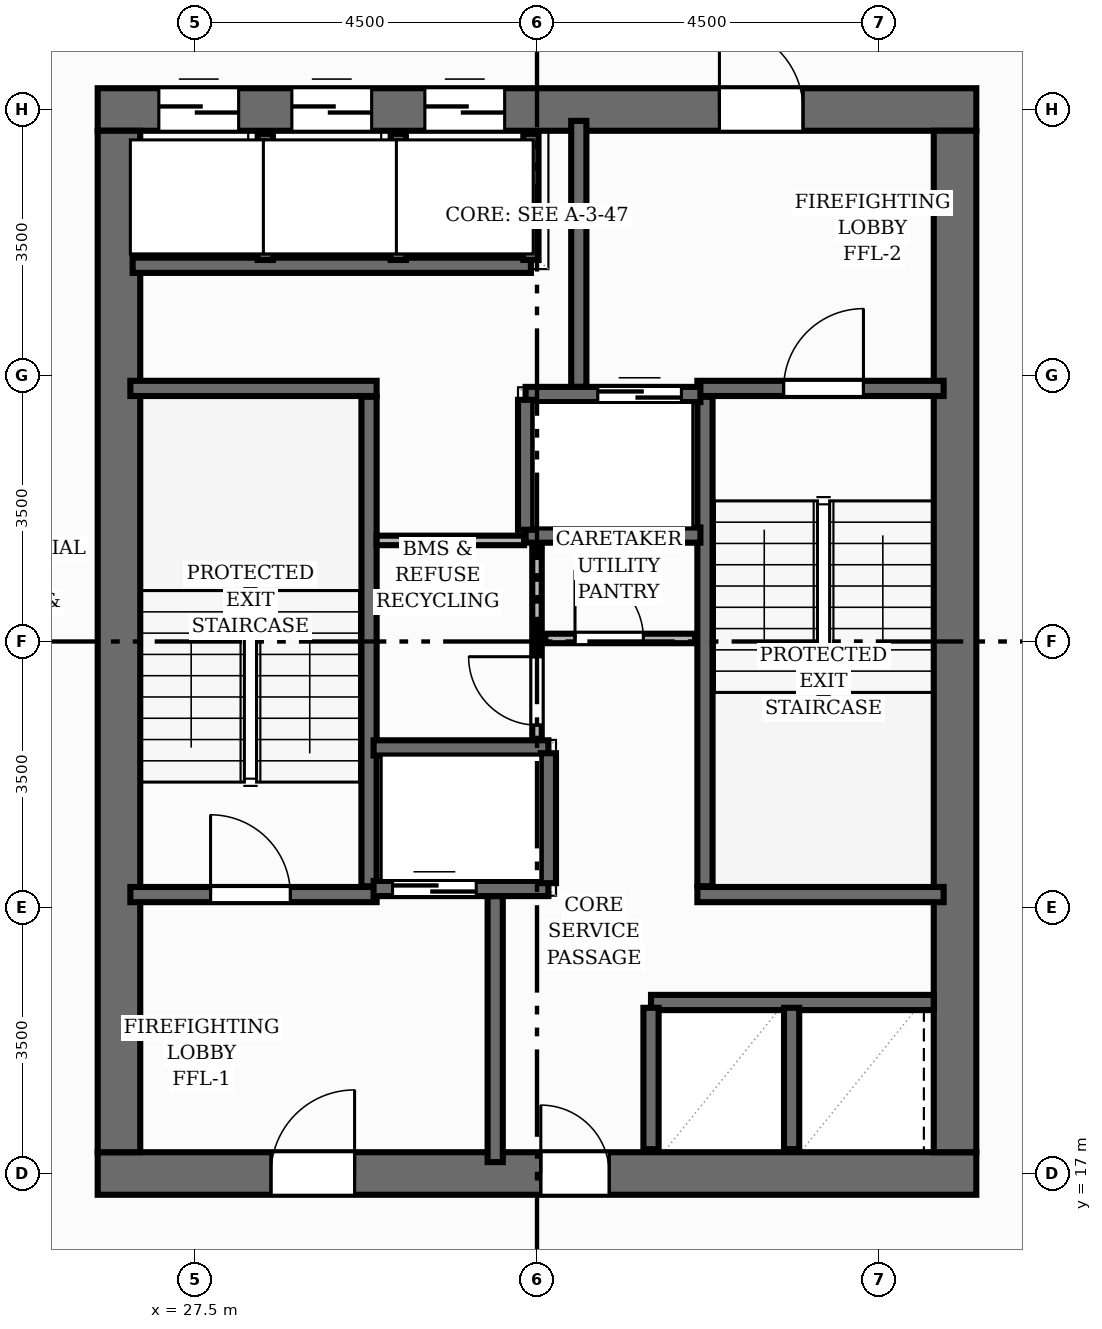
"""IFC4 building model, lengths in metres.
Left out: names, types, materials, properties, quantities, classifications, styles, units other than length and angle.
Written with IfcOpenShell. Run it as: python <this file> out.ifc"""

import sys

from ifc_helpers import new_model, si_unit, direction, frame, frame_2d, origin, place, context, subcontext, project, spatial, rectangle, extrude, element, fill, save


model = new_model("IFC4")
c1 = context("Model", 3, precision=1e-05, world=origin(), true_north=direction((0.0, 1.0)))
c2 = subcontext(c1, "Body", "Model", "MODEL_VIEW")
j1 = project(units=[si_unit("LENGTHUNIT", "METRE"), si_unit("PLANEANGLEUNIT", "RADIAN")], contexts=[c1])
p1 = place(None, origin())
s1 = spatial("IfcSite", under=j1, at=p1, CompositionType="ELEMENT")
p2 = place(p1, origin())
s2 = spatial("IfcBuilding", under=s1, at=p2, CompositionType="ELEMENT")
p3 = place(p2, frame((0.0, 0.0, 195.04)))
s3 = spatial("IfcBuildingStorey", under=s2, at=p3, CompositionType="ELEMENT", Elevation=195.04)
p4 = place(p3, frame((26.22, 17.0, 0.0), z_axis=(0.0, 0.0, 1.0), x_axis=(1.0, 0.0, 0.0)))
e1 = element("IfcWall", 1, at=p4, inside=s3, PredefinedType="SHEAR", context=c2, shape_type="SweptSolid", body=[
    extrude(rectangle(XDim=11.56, YDim=0.56, at=frame_2d((5.78, 0.0))), origin(), (0.0, 0.0, 1.0), 3.2),
])
p5 = place(p4, frame((2.28, 0.0, 0.0)))
e2 = element("IfcOpeningElement", 2, at=p5, cuts=e1, PredefinedType="OPENING", context=c2, shape_type="SweptSolid", body=[
    extrude(rectangle(XDim=1.1, YDim=2.15, at=frame_2d((0.55, 1.075))), frame((0.0, 0.29, 0.0), z_axis=(0.0, -1.0, 0.0), x_axis=(1.0, 0.0, 0.0)), (0.0, 0.0, 1.0), 0.58),
])
p6 = place(p4, frame((5.83, 0.0, 0.0)))
e3 = element("IfcOpeningElement", 3, at=p6, cuts=e1, PredefinedType="OPENING", context=c2, shape_type="SweptSolid", body=[
    extrude(rectangle(XDim=0.9, YDim=2.1, at=frame_2d((0.45, 1.05))), frame((0.0, 0.29, 0.0), z_axis=(0.0, -1.0, 0.0), x_axis=(1.0, 0.0, 0.0)), (0.0, 0.0, 1.0), 0.58),
])
p7 = place(p3, frame((26.22, 31.0, 0.0), z_axis=(0.0, 0.0, 1.0), x_axis=(1.0, 0.0, 0.0)))
e4 = element("IfcWall", 4, at=p7, inside=s3, PredefinedType="SHEAR", context=c2, shape_type="SweptSolid", body=[
    extrude(rectangle(XDim=11.56, YDim=0.56, at=frame_2d((5.78, 0.0))), origin(), (0.0, 0.0, 1.0), 3.2),
])
p8 = place(p7, frame((8.18, 0.0, 0.0)))
e5 = element("IfcOpeningElement", 5, at=p8, cuts=e4, PredefinedType="OPENING", context=c2, shape_type="SweptSolid", body=[
    extrude(rectangle(XDim=1.1, YDim=2.15, at=frame_2d((0.55, 1.075))), frame((0.0, 0.29, 0.0), z_axis=(0.0, -1.0, 0.0), x_axis=(1.0, 0.0, 0.0)), (0.0, 0.0, 1.0), 0.58),
])
p9 = place(p7, frame((0.805, 0.0, 0.0)))
e6 = element("IfcOpeningElement", 6, at=p9, cuts=e4, PredefinedType="OPENING", context=c2, shape_type="SweptSolid", body=[
    extrude(rectangle(XDim=1.05, YDim=2.15, at=frame_2d((0.525, 1.075))), frame((0.0, 0.29, 0.0), z_axis=(0.0, -1.0, 0.0), x_axis=(1.0, 0.0, 0.0)), (0.0, 0.0, 1.0), 0.58),
])
p10 = place(p7, frame((2.555, 0.0, 0.0)))
e7 = element("IfcOpeningElement", 7, at=p10, cuts=e4, PredefinedType="OPENING", context=c2, shape_type="SweptSolid", body=[
    extrude(rectangle(XDim=1.05, YDim=2.15, at=frame_2d((0.525, 1.075))), frame((0.0, 0.29, 0.0), z_axis=(0.0, -1.0, 0.0), x_axis=(1.0, 0.0, 0.0)), (0.0, 0.0, 1.0), 0.58),
])
p11 = place(p7, frame((4.305, 0.0, 0.0)))
e8 = element("IfcOpeningElement", 8, at=p11, cuts=e4, PredefinedType="OPENING", context=c2, shape_type="SweptSolid", body=[
    extrude(rectangle(XDim=1.05, YDim=2.15, at=frame_2d((0.525, 1.075))), frame((0.0, 0.29, 0.0), z_axis=(0.0, -1.0, 0.0), x_axis=(1.0, 0.0, 0.0)), (0.0, 0.0, 1.0), 0.58),
])
for number, where, z_axis, x_axis in (
    (9, (26.5, 17.28, 0.0), (0.0, 0.0, 1.0), (0.0, 1.0, 0.0)),
    (10, (37.5, 17.28, 0.0), (0.0, 0.0, 1.0), (0.0, 1.0, 0.0)),
):
    element("IfcWall", number, at=place(p3, frame(where, z_axis=z_axis, x_axis=x_axis)), inside=s3, PredefinedType="SHEAR", context=c2, shape_type="SweptSolid", body=[
        extrude(rectangle(XDim=13.44, YDim=0.56, at=frame_2d((6.72, 0.0))), origin(), (0.0, 0.0, 1.0), 3.2),
    ])
p12 = place(p3, frame((29.79, 20.78, 0.0), z_axis=(0.0, 0.0, 1.0), x_axis=(0.0, 1.0, 0.0)))
e11 = element("IfcWall", 11, at=p12, inside=s3, PredefinedType="SHEAR", context=c2, shape_type="SweptSolid", body=[
    extrude(rectangle(XDim=6.44, YDim=0.2, at=frame_2d((3.22, 0.0))), origin(), (0.0, 0.0, 1.0), 3.2),
])
p13 = place(p3, frame((26.65, 27.33, 0.0), z_axis=(0.0, 0.0, 1.0), x_axis=(1.0, 0.0, 0.0)))
e12 = element("IfcWall", 12, at=p13, inside=s3, PredefinedType="SHEAR", context=c2, shape_type="SweptSolid", body=[
    extrude(rectangle(XDim=3.24, YDim=0.2, at=frame_2d((1.62, 0.0))), origin(), (0.0, 0.0, 1.0), 3.2),
])
p14 = place(p3, frame((26.65, 20.67, 0.0), z_axis=(0.0, 0.0, 1.0), x_axis=(1.0, 0.0, 0.0)))
e13 = element("IfcWall", 13, at=p14, inside=s3, PredefinedType="SHEAR", context=c2, shape_type="SweptSolid", body=[
    extrude(rectangle(XDim=3.24, YDim=0.2, at=frame_2d((1.62, 0.0))), origin(), (0.0, 0.0, 1.0), 3.2),
])
p15 = place(p14, frame((1.055, 0.0, 0.0)))
e14 = element("IfcOpeningElement", 14, at=p15, cuts=e13, PredefinedType="OPENING", context=c2, shape_type="SweptSolid", body=[
    extrude(rectangle(XDim=1.05, YDim=2.15, at=frame_2d((0.525, 1.075))), frame((0.0, 0.11, 0.0), z_axis=(0.0, -1.0, 0.0), x_axis=(1.0, 0.0, 0.0)), (0.0, 0.0, 1.0), 0.22),
])
p16 = place(p3, frame((34.21, 20.78, 0.0), z_axis=(0.0, 0.0, 1.0), x_axis=(0.0, 1.0, 0.0)))
e15 = element("IfcWall", 15, at=p16, inside=s3, PredefinedType="SHEAR", context=c2, shape_type="SweptSolid", body=[
    extrude(rectangle(XDim=6.44, YDim=0.2, at=frame_2d((3.22, 0.0))), origin(), (0.0, 0.0, 1.0), 3.2),
])
p17 = place(p3, frame((34.11, 20.67, 0.0), z_axis=(0.0, 0.0, 1.0), x_axis=(1.0, 0.0, 0.0)))
e16 = element("IfcWall", 16, at=p17, inside=s3, PredefinedType="SHEAR", context=c2, shape_type="SweptSolid", body=[
    extrude(rectangle(XDim=3.24, YDim=0.2, at=frame_2d((1.62, 0.0))), origin(), (0.0, 0.0, 1.0), 3.2),
])
p18 = place(p3, frame((34.11, 27.33, 0.0), z_axis=(0.0, 0.0, 1.0), x_axis=(1.0, 0.0, 0.0)))
e17 = element("IfcWall", 17, at=p18, inside=s3, PredefinedType="SHEAR", context=c2, shape_type="SweptSolid", body=[
    extrude(rectangle(XDim=3.24, YDim=0.2, at=frame_2d((1.62, 0.0))), origin(), (0.0, 0.0, 1.0), 3.2),
])
p19 = place(p18, frame((1.135, 0.0, 0.0)))
e18 = element("IfcOpeningElement", 18, at=p19, cuts=e17, PredefinedType="OPENING", context=c2, shape_type="SweptSolid", body=[
    extrude(rectangle(XDim=1.05, YDim=2.15, at=frame_2d((0.525, 1.075))), frame((0.0, 0.11, 0.0), z_axis=(0.0, -1.0, 0.0), x_axis=(1.0, 0.0, 0.0)), (0.0, 0.0, 1.0), 0.22),
])
for number, where, z_axis, x_axis in (
    (19, (31.45, 17.15, 0.0), (0.0, 0.0, 1.0), (0.0, 1.0, 0.0)),
    (20, (32.55, 27.35, 0.0), (0.0, 0.0, 1.0), (0.0, 1.0, 0.0)),
):
    element("IfcWall", number, at=place(p3, frame(where, z_axis=z_axis, x_axis=x_axis)), inside=s3, PredefinedType="SHEAR", context=c2, shape_type="SweptSolid", body=[
        extrude(rectangle(XDim=3.5, YDim=0.2, at=frame_2d((1.75, 0.0))), origin(), (0.0, 0.0, 1.0), 3.2),
    ])
p20 = place(p3, frame((29.85, 20.75, 0.0), z_axis=(0.0, 0.0, 1.0), x_axis=(1.0, 0.0, 0.0)))
e21 = element("IfcWall", 21, at=p20, inside=s3, PredefinedType="SHEAR", context=c2, shape_type="SweptSolid", body=[
    extrude(rectangle(XDim=2.3, YDim=0.2, at=frame_2d((1.15, 0.0))), origin(), (0.0, 0.0, 1.0), 3.2),
])
p21 = place(p20, frame((0.25, 0.0, 0.0)))
e22 = element("IfcOpeningElement", 22, at=p21, cuts=e21, PredefinedType="OPENING", context=c2, shape_type="SweptSolid", body=[
    extrude(rectangle(XDim=1.1, YDim=2.15, at=frame_2d((0.55, 1.075))), frame((0.0, 0.11, 0.0), z_axis=(0.0, -1.0, 0.0), x_axis=(1.0, 0.0, 0.0)), (0.0, 0.0, 1.0), 0.22),
])
p22 = place(p3, frame((29.85, 22.6, 0.0), z_axis=(0.0, 0.0, 1.0), x_axis=(1.0, 0.0, 0.0)))
e23 = element("IfcWall", 23, at=p22, inside=s3, PredefinedType="SHEAR", context=c2, shape_type="SweptSolid", body=[
    extrude(rectangle(XDim=2.3, YDim=0.2, at=frame_2d((1.15, 0.0))), origin(), (0.0, 0.0, 1.0), 3.2),
])
p23 = place(p3, frame((32.15, 20.82, 0.0), z_axis=(0.0, 0.0, 1.0), x_axis=(0.0, 1.0, 0.0)))
e24 = element("IfcWall", 24, at=p23, inside=s3, PredefinedType="SHEAR", context=c2, shape_type="SweptSolid", body=[
    extrude(rectangle(XDim=1.71, YDim=0.2, at=frame_2d((0.855, 0.0))), origin(), (0.0, 0.0, 1.0), 3.2),
])
p24 = place(p3, frame((31.85, 27.25, 0.0), z_axis=(0.0, 0.0, 1.0), x_axis=(1.0, 0.0, 0.0)))
e25 = element("IfcWall", 25, at=p24, inside=s3, PredefinedType="SHEAR", context=c2, shape_type="SweptSolid", body=[
    extrude(rectangle(XDim=2.3, YDim=0.2, at=frame_2d((1.15, 0.0))), origin(), (0.0, 0.0, 1.0), 3.2),
])
p25 = place(p24, frame((0.95, 0.0, 0.0)))
e26 = element("IfcOpeningElement", 26, at=p25, cuts=e25, PredefinedType="OPENING", context=c2, shape_type="SweptSolid", body=[
    extrude(rectangle(XDim=1.1, YDim=2.15, at=frame_2d((0.55, 1.075))), frame((0.0, 0.11, 0.0), z_axis=(0.0, -1.0, 0.0), x_axis=(1.0, 0.0, 0.0)), (0.0, 0.0, 1.0), 0.22),
])
p26 = place(p3, frame((31.85, 25.4, 0.0), z_axis=(0.0, 0.0, 1.0), x_axis=(1.0, 0.0, 0.0)))
e27 = element("IfcWall", 27, at=p26, inside=s3, PredefinedType="SHEAR", context=c2, shape_type="SweptSolid", body=[
    extrude(rectangle(XDim=2.3, YDim=0.2, at=frame_2d((1.15, 0.0))), origin(), (0.0, 0.0, 1.0), 3.2),
])
p27 = place(p3, frame((31.85, 25.47, 0.0), z_axis=(0.0, 0.0, 1.0), x_axis=(0.0, 1.0, 0.0)))
e28 = element("IfcWall", 28, at=p27, inside=s3, PredefinedType="SHEAR", context=c2, shape_type="SweptSolid", body=[
    extrude(rectangle(XDim=1.71, YDim=0.2, at=frame_2d((0.855, 0.0))), origin(), (0.0, 0.0, 1.0), 3.2),
])
p28 = place(p3, frame((26.68, 28.95, 0.0), z_axis=(0.0, 0.0, 1.0), x_axis=(1.0, 0.0, 0.0)))
e29 = element("IfcWall", 29, at=p28, inside=s3, PredefinedType="SHEAR", context=c2, shape_type="SweptSolid", body=[
    extrude(rectangle(XDim=5.24, YDim=0.2, at=frame_2d((2.62, 0.0))), origin(), (0.0, 0.0, 1.0), 3.2),
])
for number, where, z_axis, x_axis in (
    (30, (31.92, 29.02, 0.0), (0.0, 0.0, 1.0), (0.0, 1.0, 0.0)),
    (31, (28.425, 29.02, 0.0), (0.0, 0.0, 1.0), (0.0, 1.0, 0.0)),
    (32, (30.175, 29.02, 0.0), (0.0, 0.0, 1.0), (0.0, 1.0, 0.0)),
):
    element("IfcWall", number, at=place(p3, frame(where, z_axis=z_axis, x_axis=x_axis)), inside=s3, PredefinedType="SHEAR", context=c2, shape_type="SweptSolid", body=[
        extrude(rectangle(XDim=1.66, YDim=0.2, at=frame_2d((0.83, 0.0))), origin(), (0.0, 0.0, 1.0), 3.2),
    ])
p29 = place(p3, frame((33.5, 19.25, 0.0), z_axis=(0.0, 0.0, 1.0), x_axis=(1.0, 0.0, 0.0)))
e33 = element("IfcWall", 33, at=p29, inside=s3, PredefinedType="SHEAR", context=c2, shape_type="SweptSolid", body=[
    extrude(rectangle(XDim=3.72, YDim=0.2, at=frame_2d((1.86, 0.0))), origin(), (0.0, 0.0, 1.0), 3.2),
])
for number, where, z_axis, x_axis in (
    (34, (33.5, 17.32, 0.0), (0.0, 0.0, 1.0), (0.0, 1.0, 0.0)),
    (35, (35.35, 17.32, 0.0), (0.0, 0.0, 1.0), (0.0, 1.0, 0.0)),
):
    element("IfcWall", number, at=place(p3, frame(where, z_axis=z_axis, x_axis=x_axis)), inside=s3, PredefinedType="SHEAR", context=c2, shape_type="SweptSolid", body=[
        extrude(rectangle(XDim=1.86, YDim=0.2, at=frame_2d((0.93, 0.0))), origin(), (0.0, 0.0, 1.0), 3.2),
    ])
p30 = place(p3, frame((32.0, 22.72, 0.0), z_axis=(0.0, 0.0, 1.0), x_axis=(0.0, 1.0, 0.0)))
e36 = element("IfcWall", 36, at=p30, inside=s3, PredefinedType="PARTITIONING", context=c2, shape_type="SweptSolid", body=[
    extrude(rectangle(XDim=2.52, YDim=0.125, at=frame_2d((1.26, 0.0))), origin(), (0.0, 0.0, 1.0), 2.955),
])
p31 = place(p30, frame((0.18, 0.0, 0.0)))
e37 = element("IfcOpeningElement", 37, at=p31, cuts=e36, PredefinedType="OPENING", context=c2, shape_type="SweptSolid", body=[
    extrude(rectangle(XDim=0.9, YDim=2.1, at=frame_2d((0.45, 1.05))), frame((0.0, 0.073, 0.0), z_axis=(0.0, -1.0, 0.0), x_axis=(1.0, 0.0, 0.0)), (0.0, 0.0, 1.0), 0.145),
])
p32 = place(p3, frame((32.11, 24.04, 0.0), z_axis=(0.0, 0.0, 1.0), x_axis=(1.0, 0.0, 0.0)))
e38 = element("IfcWall", 38, at=p32, inside=s3, PredefinedType="PARTITIONING", context=c2, shape_type="SweptSolid", body=[
    extrude(rectangle(XDim=1.97, YDim=0.125, at=frame_2d((0.985, 0.0))), origin(), (0.0, 0.0, 1.0), 2.955),
])
p33 = place(p32, frame((0.39, 0.0, 0.0)))
e39 = element("IfcOpeningElement", 39, at=p33, cuts=e38, PredefinedType="OPENING", context=c2, shape_type="SweptSolid", body=[
    extrude(rectangle(XDim=0.9, YDim=2.1, at=frame_2d((0.45, 1.05))), frame((0.0, 0.073, 0.0), z_axis=(0.0, -1.0, 0.0), x_axis=(1.0, 0.0, 0.0)), (0.0, 0.0, 1.0), 0.145),
])
p34 = place(p3, frame((29.89, 25.33, 0.0), z_axis=(0.0, 0.0, 1.0), x_axis=(1.0, 0.0, 0.0)))
e40 = element("IfcWall", 40, at=p34, inside=s3, PredefinedType="PARTITIONING", context=c2, shape_type="SweptSolid", body=[
    extrude(rectangle(XDim=1.94, YDim=0.125, at=frame_2d((0.97, 0.0))), origin(), (0.0, 0.0, 1.0), 2.955),
])
p35 = place(p15, origin())
e41 = element("IfcDoor", 41, at=p35, inside=s3, OperationType="SINGLE_SWING_LEFT", PredefinedType="DOOR", context=c2, shape_type="SweptSolid", body=[
    extrude(rectangle(XDim=1.05, YDim=2.15, at=frame_2d((0.525, 1.075))), frame((0.0, 0.025, 0.0), z_axis=(0.0, -1.0, 0.0), x_axis=(1.0, 0.0, 0.0)), (0.0, 0.0, 1.0), 0.05),
])
fill(e14, e41)
p36 = place(p19, origin())
e42 = element("IfcDoor", 42, at=p36, inside=s3, OperationType="SINGLE_SWING_RIGHT", PredefinedType="DOOR", context=c2, shape_type="SweptSolid", body=[
    extrude(rectangle(XDim=1.05, YDim=2.15, at=frame_2d((0.525, 1.075))), frame((0.0, 0.025, 0.0), z_axis=(0.0, -1.0, 0.0), x_axis=(1.0, 0.0, 0.0)), (0.0, 0.0, 1.0), 0.05),
])
fill(e18, e42)
p37 = place(p5, origin())
e43 = element("IfcDoor", 43, at=p37, inside=s3, OperationType="SINGLE_SWING_RIGHT", PredefinedType="DOOR", context=c2, shape_type="SweptSolid", body=[
    extrude(rectangle(XDim=1.1, YDim=2.15, at=frame_2d((0.55, 1.075))), frame((0.0, 0.025, 0.0), z_axis=(0.0, -1.0, 0.0), x_axis=(1.0, 0.0, 0.0)), (0.0, 0.0, 1.0), 0.05),
])
fill(e2, e43)
p38 = place(p8, origin())
e44 = element("IfcDoor", 44, at=p38, inside=s3, OperationType="SINGLE_SWING_LEFT", PredefinedType="DOOR", context=c2, shape_type="SweptSolid", body=[
    extrude(rectangle(XDim=1.1, YDim=2.15, at=frame_2d((0.55, 1.075))), frame((0.0, 0.025, 0.0), z_axis=(0.0, -1.0, 0.0), x_axis=(1.0, 0.0, 0.0)), (0.0, 0.0, 1.0), 0.05),
])
fill(e5, e44)
p39 = place(p21, origin())
e45 = element("IfcDoor", 45, at=p39, inside=s3, OperationType="DOUBLE_DOOR_SLIDING", PredefinedType="DOOR", context=c2, shape_type="SweptSolid", body=[
    extrude(rectangle(XDim=1.1, YDim=2.15, at=frame_2d((0.55, 1.075))), frame((0.0, 0.025, 0.0), z_axis=(0.0, -1.0, 0.0), x_axis=(1.0, 0.0, 0.0)), (0.0, 0.0, 1.0), 0.05),
])
fill(e22, e45)
p40 = place(p25, origin())
e46 = element("IfcDoor", 46, at=p40, inside=s3, OperationType="DOUBLE_DOOR_SLIDING", PredefinedType="DOOR", context=c2, shape_type="SweptSolid", body=[
    extrude(rectangle(XDim=1.1, YDim=2.15, at=frame_2d((0.55, 1.075))), frame((0.0, 0.025, 0.0), z_axis=(0.0, -1.0, 0.0), x_axis=(1.0, 0.0, 0.0)), (0.0, 0.0, 1.0), 0.05),
])
fill(e26, e46)
p41 = place(p9, origin())
e47 = element("IfcDoor", 47, at=p41, inside=s3, OperationType="DOUBLE_DOOR_SLIDING", PredefinedType="DOOR", context=c2, shape_type="SweptSolid", body=[
    extrude(rectangle(XDim=1.05, YDim=2.15, at=frame_2d((0.525, 1.075))), frame((0.0, 0.025, 0.0), z_axis=(0.0, -1.0, 0.0), x_axis=(1.0, 0.0, 0.0)), (0.0, 0.0, 1.0), 0.05),
])
fill(e6, e47)
p42 = place(p10, origin())
e48 = element("IfcDoor", 48, at=p42, inside=s3, OperationType="DOUBLE_DOOR_SLIDING", PredefinedType="DOOR", context=c2, shape_type="SweptSolid", body=[
    extrude(rectangle(XDim=1.05, YDim=2.15, at=frame_2d((0.525, 1.075))), frame((0.0, 0.025, 0.0), z_axis=(0.0, -1.0, 0.0), x_axis=(1.0, 0.0, 0.0)), (0.0, 0.0, 1.0), 0.05),
])
fill(e7, e48)
p43 = place(p11, origin())
e49 = element("IfcDoor", 49, at=p43, inside=s3, OperationType="DOUBLE_DOOR_SLIDING", PredefinedType="DOOR", context=c2, shape_type="SweptSolid", body=[
    extrude(rectangle(XDim=1.05, YDim=2.15, at=frame_2d((0.525, 1.075))), frame((0.0, 0.025, 0.0), z_axis=(0.0, -1.0, 0.0), x_axis=(1.0, 0.0, 0.0)), (0.0, 0.0, 1.0), 0.05),
])
fill(e8, e49)
p44 = place(p6, origin())
e50 = element("IfcDoor", 50, at=p44, inside=s3, OperationType="SINGLE_SWING_LEFT", PredefinedType="DOOR", context=c2, shape_type="SweptSolid", body=[
    extrude(rectangle(XDim=0.9, YDim=2.1, at=frame_2d((0.45, 1.05))), frame((0.0, 0.025, 0.0), z_axis=(0.0, -1.0, 0.0), x_axis=(1.0, 0.0, 0.0)), (0.0, 0.0, 1.0), 0.05),
])
fill(e3, e50)
p45 = place(p33, origin())
e51 = element("IfcDoor", 51, at=p45, inside=s3, OperationType="SINGLE_SWING_LEFT", PredefinedType="DOOR", context=c2, shape_type="SweptSolid", body=[
    extrude(rectangle(XDim=0.9, YDim=2.1, at=frame_2d((0.45, 1.05))), frame((0.0, 0.025, 0.0), z_axis=(0.0, -1.0, 0.0), x_axis=(1.0, 0.0, 0.0)), (0.0, 0.0, 1.0), 0.05),
])
fill(e39, e51)
p46 = place(p31, origin())
e52 = element("IfcDoor", 52, at=p46, inside=s3, OperationType="SINGLE_SWING_RIGHT", PredefinedType="DOOR", context=c2, shape_type="SweptSolid", body=[
    extrude(rectangle(XDim=0.9, YDim=2.1, at=frame_2d((0.45, 1.05))), frame((0.0, 0.025, 0.0), z_axis=(0.0, -1.0, 0.0), x_axis=(1.0, 0.0, 0.0)), (0.0, 0.0, 1.0), 0.05),
])
fill(e37, e52)
save(model, sys.argv[1])
